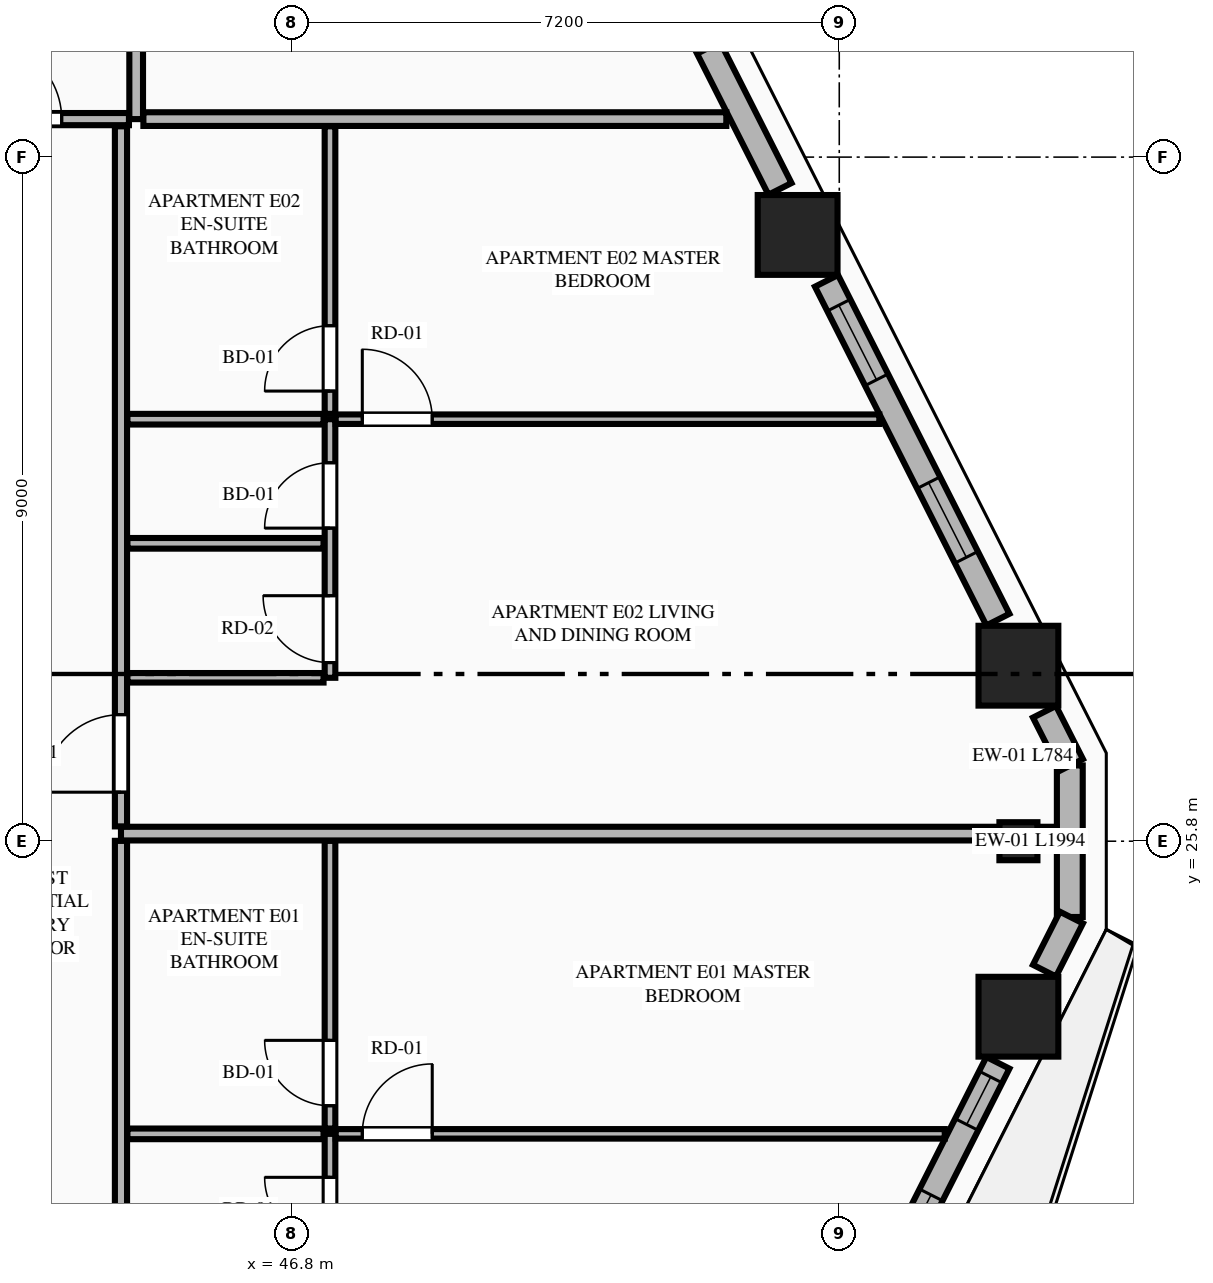
"""IFC4 building model, lengths in metres.
Left out: names, types, materials, properties, quantities, classifications, styles, units other than length and angle.
Written with IfcOpenShell. Run it as: python <this file> out.ifc"""

import sys

from ifc_helpers import new_model, si_unit, direction, frame, frame_2d, origin, origin_2d, place, context, subcontext, project, spatial, rectangle, extrude, element, fill, save


model = new_model("IFC4")
c1 = context("Model", 3, precision=1e-05, world=origin(), true_north=direction((0.0, 1.0)))
c2 = subcontext(c1, "Body", "Model", "MODEL_VIEW")
j1 = project(units=[si_unit("LENGTHUNIT", "METRE"), si_unit("PLANEANGLEUNIT", "RADIAN")], contexts=[c1])
p1 = place(None, origin())
s1 = spatial("IfcSite", under=j1, at=p1, CompositionType="ELEMENT")
p2 = place(p1, origin())
s2 = spatial("IfcBuilding", under=s1, at=p2, CompositionType="ELEMENT")
p3 = place(p2, frame((0.0, 0.0, 137.45)))
s3 = spatial("IfcBuildingStorey", under=s2, at=p3, CompositionType="ELEMENT", Elevation=137.45)
for number, where, z_axis, x_axis in (
    (1, (56.357, 23.491, 0.0), (0.0, 0.0, 1.0), (1.0, 0.0, 0.0)),
    (2, (56.357, 28.109, 0.0), (0.0, 0.0, 1.0), (1.0, 0.0, 0.0)),
    (3, (53.452, 33.776, 0.0), (0.0, 0.0, 1.0), (1.0, 0.0, 0.0)),
):
    element("IfcColumn", number, at=place(p3, frame(where, z_axis=z_axis, x_axis=x_axis)), inside=s3, PredefinedType="COLUMN", context=c2, shape_type="SweptSolid", body=[
        extrude(rectangle(XDim=1.05, YDim=1.05, at=origin_2d()), origin(), (0.0, 0.0, 1.0), 3.55),
    ])
p4 = place(p3, frame((56.357, 25.8, 0.0), z_axis=(0.0, 0.0, 1.0), x_axis=(0.0, 1.0, 0.0)))
e4 = element("IfcColumn", 4, at=p4, inside=s3, PredefinedType="PILASTER", context=c2, shape_type="SweptSolid", body=[
    extrude(rectangle(XDim=0.5, YDim=0.35, at=origin_2d()), origin(), (0.0, 0.0, 1.0), 3.55),
])
p5 = place(p3, frame((57.033, 24.803, 0.0), z_axis=(0.0, 0.0, 1.0), x_axis=(0.0, 1.0, 0.0)))
e5 = element("IfcWall", 5, at=p5, inside=s3, PredefinedType="STANDARD", context=c2, shape_type="SweptSolid", body=[
    extrude(rectangle(XDim=1.994, YDim=0.34, at=frame_2d((0.997, 0.0))), origin(), (0.0, 0.0, 1.0), 3.34),
])
p6 = place(p3, frame((53.832, 18.428, 0.0), z_axis=(0.0, 0.0, 1.0), x_axis=(0.451431617681, 0.892305718102, 0.0)))
e6 = element("IfcWall", 6, at=p6, inside=s3, PredefinedType="STANDARD", context=c2, shape_type="SweptSolid", body=[
    extrude(rectangle(XDim=4.995, YDim=0.34, at=frame_2d((2.498, 0.0))), origin(), (0.0, 0.0, 1.0), 2.797),
])
p7 = place(p6, frame((1.947, 0.0, 0.75)))
e7 = element("IfcOpeningElement", 7, at=p7, cuts=e6, PredefinedType="OPENING", context=c2, shape_type="SweptSolid", body=[
    extrude(rectangle(XDim=1.1, YDim=1.897, at=frame_2d((0.55, 0.948))), frame((0.0, 0.18, 0.0), z_axis=(0.0, -1.0, 0.0), x_axis=(1.0, 0.0, 0.0)), (0.0, 0.0, 1.0), 0.36),
])
p8 = place(p6, frame((4.085, 0.0, 0.75)))
e8 = element("IfcOpeningElement", 8, at=p8, cuts=e6, PredefinedType="OPENING", context=c2, shape_type="SweptSolid", body=[
    extrude(rectangle(XDim=0.7, YDim=1.897, at=frame_2d((0.35, 0.948))), frame((0.0, 0.18, 0.0), z_axis=(0.0, -1.0, 0.0), x_axis=(1.0, 0.0, 0.0)), (0.0, 0.0, 1.0), 0.36),
])
for number, where, z_axis, x_axis in (
    (9, (56.7, 24.097, 0.0), (0.0, 0.0, 1.0), (0.452, 0.892, 0.0)),
    (10, (57.054, 26.804, 0.0), (0.0, 0.0, 1.0), (-0.452, 0.892, 0.0)),
):
    element("IfcWall", number, at=place(p3, frame(where, z_axis=z_axis, x_axis=x_axis)), inside=s3, PredefinedType="STANDARD", context=c2, shape_type="SweptSolid", body=[
        extrude(rectangle(XDim=0.783, YDim=0.34, at=frame_2d((0.392, 0.0))), origin(), (0.0, 0.0, 1.0), 3.34),
    ])
p9 = place(p3, frame((56.087, 28.715, 0.0), z_axis=(0.0, 0.0, 1.0), x_axis=(-0.451431617681, 0.892305718102, 0.0)))
e11 = element("IfcWall", 11, at=p9, inside=s3, PredefinedType="STANDARD", context=c2, shape_type="SweptSolid", body=[
    extrude(rectangle(XDim=4.995, YDim=0.34, at=frame_2d((2.498, 0.0))), origin(), (0.0, 0.0, 1.0), 2.797),
])
p10 = place(p9, frame((0.919, 0.0, 0.75)))
e12 = element("IfcOpeningElement", 12, at=p10, cuts=e11, PredefinedType="OPENING", context=c2, shape_type="SweptSolid", body=[
    extrude(rectangle(XDim=1.1, YDim=1.897, at=frame_2d((0.55, 0.948))), frame((0.0, 0.18, 0.0), z_axis=(0.0, -1.0, 0.0), x_axis=(1.0, 0.0, 0.0)), (0.0, 0.0, 1.0), 0.36),
])
p11 = place(p9, frame((3.536, 0.0, 0.75)))
e13 = element("IfcOpeningElement", 13, at=p11, cuts=e11, PredefinedType="OPENING", context=c2, shape_type="SweptSolid", body=[
    extrude(rectangle(XDim=1.1, YDim=1.897, at=frame_2d((0.55, 0.948))), frame((0.0, 0.18, 0.0), z_axis=(0.0, -1.0, 0.0), x_axis=(1.0, 0.0, 0.0)), (0.0, 0.0, 1.0), 0.36),
])
p12 = place(p3, frame((53.22, 34.382, 0.0), z_axis=(0.0, 0.0, 1.0), x_axis=(-0.451567731634, 0.892236842855, 0.0)))
e14 = element("IfcWall", 14, at=p12, inside=s3, PredefinedType="STANDARD", context=c2, shape_type="SweptSolid", body=[
    extrude(rectangle(XDim=5.219, YDim=0.34, at=frame_2d((2.61, 0.0))), origin(), (0.0, 0.0, 1.0), 2.797),
])
p13 = place(p12, frame((2.06, 0.0, 0.75)))
e15 = element("IfcOpeningElement", 15, at=p13, cuts=e14, PredefinedType="OPENING", context=c2, shape_type="SweptSolid", body=[
    extrude(rectangle(XDim=1.1, YDim=1.897, at=frame_2d((0.55, 0.948))), frame((0.0, 0.18, 0.0), z_axis=(0.0, -1.0, 0.0), x_axis=(1.0, 0.0, 0.0)), (0.0, 0.0, 1.0), 0.36),
])
p14 = place(p3, frame((44.75, 35.3, 0.0), z_axis=(0.0, 0.0, 1.0), x_axis=(0.0, 1.0, 0.0)))
e16 = element("IfcWall", 16, at=p14, inside=s3, PredefinedType="PARTITIONING", context=c2, shape_type="SweptSolid", body=[
    extrude(rectangle(XDim=12.195, YDim=0.18, at=frame_2d((6.098, 0.0))), origin(), (0.0, 0.0, 1.0), 3.34),
])
p15 = place(p3, frame((28.663, 35.3, 0.0), z_axis=(0.0, 0.0, 1.0), x_axis=(1.0, 0.0, 0.0)))
e17 = element("IfcWall", 17, at=p15, inside=s3, PredefinedType="PARTITIONING", context=c2, shape_type="SweptSolid", body=[
    extrude(rectangle(XDim=15.992, YDim=0.16, at=frame_2d((7.996, 0.0))), origin(), (0.0, 0.0, 1.0), 3.34),
])
p16 = place(p15, frame((14.087, 0.0, 0.0)))
e18 = element("IfcOpeningElement", 18, at=p16, cuts=e17, PredefinedType="OPENING", context=c2, shape_type="SweptSolid", body=[
    extrude(rectangle(XDim=1.02, YDim=2.25, at=frame_2d((0.51, 1.125))), frame((0.0, 0.09, 0.0), z_axis=(0.0, -1.0, 0.0), x_axis=(1.0, 0.0, 0.0)), (0.0, 0.0, 1.0), 0.18),
])
p17 = place(p3, frame((44.845, 35.3, 0.0), z_axis=(0.0, 0.0, 1.0), x_axis=(1.0, 0.0, 0.0)))
e19 = element("IfcWall", 19, at=p17, inside=s3, PredefinedType="PARTITIONING", context=c2, shape_type="SweptSolid", body=[
    extrude(rectangle(XDim=7.669, YDim=0.18, at=frame_2d((3.834, 0.0))), origin(), (0.0, 0.0, 1.0), 3.34),
])
p18 = place(p3, frame((44.55, 16.595, 0.0), z_axis=(0.0, 0.0, 1.0), x_axis=(0.0, 1.0, 0.0)))
e20 = element("IfcWall", 20, at=p18, inside=s3, PredefinedType="PARTITIONING", context=c2, shape_type="SweptSolid", body=[
    extrude(rectangle(XDim=9.21, YDim=0.16, at=frame_2d((4.605, 0.0))), origin(), (0.0, 0.0, 1.0), 3.34),
])
p19 = place(p18, frame((0.45, 0.0, 0.0)))
e21 = element("IfcOpeningElement", 21, at=p19, cuts=e20, PredefinedType="OPENING", context=c2, shape_type="SweptSolid", body=[
    extrude(rectangle(XDim=1.02, YDim=2.25, at=frame_2d((0.51, 1.125))), frame((0.0, 0.09, 0.0), z_axis=(0.0, -1.0, 0.0), x_axis=(1.0, 0.0, 0.0)), (0.0, 0.0, 1.0), 0.18),
])
p20 = place(p3, frame((47.3, 18.55, 0.0), z_axis=(0.0, 0.0, 1.0), x_axis=(0.0, 1.0, 0.0)))
e22 = element("IfcWall", 22, at=p20, inside=s3, PredefinedType="PLUMBINGWALL", context=c2, shape_type="SweptSolid", body=[
    extrude(rectangle(XDim=3.4, YDim=0.14, at=frame_2d((1.7, 0.0))), origin(), (0.0, 0.0, 1.0), 3.34),
])
p21 = place(p20, frame((0.2, 0.0, 0.0)))
e23 = element("IfcOpeningElement", 23, at=p21, cuts=e22, PredefinedType="OPENING", context=c2, shape_type="SweptSolid", body=[
    extrude(rectangle(XDim=0.88, YDim=2.15, at=frame_2d((0.44, 1.075))), frame((0.0, 0.08, 0.0), z_axis=(0.0, -1.0, 0.0), x_axis=(1.0, 0.0, 0.0)), (0.0, 0.0, 1.0), 0.16),
])
p22 = place(p20, frame((1.968, 0.0, 0.0)))
e24 = element("IfcOpeningElement", 24, at=p22, cuts=e22, PredefinedType="OPENING", context=c2, shape_type="SweptSolid", body=[
    extrude(rectangle(XDim=0.86, YDim=2.1, at=frame_2d((0.43, 1.05))), frame((0.0, 0.08, 0.0), z_axis=(0.0, -1.0, 0.0), x_axis=(1.0, 0.0, 0.0)), (0.0, 0.0, 1.0), 0.16),
])
p23 = place(p3, frame((47.3, 22.02, 0.0), z_axis=(0.0, 0.0, 1.0), x_axis=(0.0, 1.0, 0.0)))
e25 = element("IfcWall", 25, at=p23, inside=s3, PredefinedType="PLUMBINGWALL", context=c2, shape_type="SweptSolid", body=[
    extrude(rectangle(XDim=3.785, YDim=0.14, at=frame_2d((1.893, 0.0))), origin(), (0.0, 0.0, 1.0), 3.34),
])
p24 = place(p23, frame((0.3, 0.0, 0.0)))
e26 = element("IfcOpeningElement", 26, at=p24, cuts=e25, PredefinedType="OPENING", context=c2, shape_type="SweptSolid", body=[
    extrude(rectangle(XDim=0.86, YDim=2.1, at=frame_2d((0.43, 1.05))), frame((0.0, 0.08, 0.0), z_axis=(0.0, -1.0, 0.0), x_axis=(1.0, 0.0, 0.0)), (0.0, 0.0, 1.0), 0.16),
])
p25 = place(p3, frame((44.635, 21.95, 0.0), z_axis=(0.0, 0.0, 1.0), x_axis=(1.0, 0.0, 0.0)))
e27 = element("IfcWall", 27, at=p25, inside=s3, PredefinedType="PLUMBINGWALL", context=c2, shape_type="SweptSolid", body=[
    extrude(rectangle(XDim=2.58, YDim=0.14, at=frame_2d((1.29, 0.0))), origin(), (0.0, 0.0, 1.0), 3.34),
])
p26 = place(p3, frame((47.375, 21.95, 0.0), z_axis=(0.0, 0.0, 1.0), x_axis=(1.0, 0.0, 0.0)))
e28 = element("IfcWall", 28, at=p26, inside=s3, PredefinedType="PARTITIONING", context=c2, shape_type="SweptSolid", body=[
    extrude(rectangle(XDim=8.013, YDim=0.125, at=frame_2d((4.006, 0.0))), origin(), (0.0, 0.0, 1.0), 3.34),
])
p27 = place(p26, frame((0.35, 0.0, 0.0)))
e29 = element("IfcOpeningElement", 29, at=p27, cuts=e28, PredefinedType="OPENING", context=c2, shape_type="SweptSolid", body=[
    extrude(rectangle(XDim=0.92, YDim=2.15, at=frame_2d((0.46, 1.075))), frame((0.0, 0.073, 0.0), z_axis=(0.0, -1.0, 0.0), x_axis=(1.0, 0.0, 0.0)), (0.0, 0.0, 1.0), 0.145),
])
p28 = place(p3, frame((44.55, 25.9, 0.0), z_axis=(0.0, 0.0, 1.0), x_axis=(1.0, 0.0, 0.0)))
e30 = element("IfcWall", 30, at=p28, inside=s3, PredefinedType="PARTITIONING", context=c2, shape_type="SweptSolid", body=[
    extrude(rectangle(XDim=12.308, YDim=0.18, at=frame_2d((6.154, 0.0))), origin(), (0.0, 0.0, 1.0), 3.34),
])
p29 = place(p3, frame((44.55, 25.995, 0.0), z_axis=(0.0, 0.0, 1.0), x_axis=(0.0, 1.0, 0.0)))
e31 = element("IfcWall", 31, at=p29, inside=s3, PredefinedType="PARTITIONING", context=c2, shape_type="SweptSolid", body=[
    extrude(rectangle(XDim=9.21, YDim=0.16, at=frame_2d((4.605, 0.0))), origin(), (0.0, 0.0, 1.0), 3.34),
])
p30 = place(p29, frame((0.45, 0.0, 0.0)))
e32 = element("IfcOpeningElement", 32, at=p30, cuts=e31, PredefinedType="OPENING", context=c2, shape_type="SweptSolid", body=[
    extrude(rectangle(XDim=1.02, YDim=2.25, at=frame_2d((0.51, 1.125))), frame((0.0, 0.09, 0.0), z_axis=(0.0, -1.0, 0.0), x_axis=(1.0, 0.0, 0.0)), (0.0, 0.0, 1.0), 0.18),
])
p31 = place(p3, frame((44.635, 27.95, 0.0), z_axis=(0.0, 0.0, 1.0), x_axis=(1.0, 0.0, 0.0)))
e33 = element("IfcWall", 33, at=p31, inside=s3, PredefinedType="PARTITIONING", context=c2, shape_type="SweptSolid", body=[
    extrude(rectangle(XDim=2.58, YDim=0.125, at=frame_2d((1.29, 0.0))), origin(), (0.0, 0.0, 1.0), 3.34),
])
p32 = place(p3, frame((47.3, 27.95, 0.0), z_axis=(0.0, 0.0, 1.0), x_axis=(0.0, 1.0, 0.0)))
e34 = element("IfcWall", 34, at=p32, inside=s3, PredefinedType="PLUMBINGWALL", context=c2, shape_type="SweptSolid", body=[
    extrude(rectangle(XDim=3.402, YDim=0.14, at=frame_2d((1.701, 0.0))), origin(), (0.0, 0.0, 1.0), 3.34),
])
p33 = place(p32, frame((0.2, 0.0, 0.0)))
e35 = element("IfcOpeningElement", 35, at=p33, cuts=e34, PredefinedType="OPENING", context=c2, shape_type="SweptSolid", body=[
    extrude(rectangle(XDim=0.88, YDim=2.15, at=frame_2d((0.44, 1.075))), frame((0.0, 0.08, 0.0), z_axis=(0.0, -1.0, 0.0), x_axis=(1.0, 0.0, 0.0)), (0.0, 0.0, 1.0), 0.16),
])
p34 = place(p32, frame((1.969, 0.0, 0.0)))
e36 = element("IfcOpeningElement", 36, at=p34, cuts=e34, PredefinedType="OPENING", context=c2, shape_type="SweptSolid", body=[
    extrude(rectangle(XDim=0.86, YDim=2.1, at=frame_2d((0.43, 1.05))), frame((0.0, 0.08, 0.0), z_axis=(0.0, -1.0, 0.0), x_axis=(1.0, 0.0, 0.0)), (0.0, 0.0, 1.0), 0.16),
])
p35 = place(p3, frame((47.3, 31.422, 0.0), z_axis=(0.0, 0.0, 1.0), x_axis=(0.0, 1.0, 0.0)))
e37 = element("IfcWall", 37, at=p35, inside=s3, PredefinedType="PLUMBINGWALL", context=c2, shape_type="SweptSolid", body=[
    extrude(rectangle(XDim=3.783, YDim=0.14, at=frame_2d((1.892, 0.0))), origin(), (0.0, 0.0, 1.0), 3.34),
])
p36 = place(p35, frame((0.3, 0.0, 0.0)))
e38 = element("IfcOpeningElement", 38, at=p36, cuts=e37, PredefinedType="OPENING", context=c2, shape_type="SweptSolid", body=[
    extrude(rectangle(XDim=0.86, YDim=2.1, at=frame_2d((0.43, 1.05))), frame((0.0, 0.08, 0.0), z_axis=(0.0, -1.0, 0.0), x_axis=(1.0, 0.0, 0.0)), (0.0, 0.0, 1.0), 0.16),
])
p37 = place(p3, frame((44.635, 31.352, 0.0), z_axis=(0.0, 0.0, 1.0), x_axis=(1.0, 0.0, 0.0)))
e39 = element("IfcWall", 39, at=p37, inside=s3, PredefinedType="PLUMBINGWALL", context=c2, shape_type="SweptSolid", body=[
    extrude(rectangle(XDim=2.58, YDim=0.14, at=frame_2d((1.29, 0.0))), origin(), (0.0, 0.0, 1.0), 3.34),
])
p38 = place(p3, frame((47.375, 31.352, 0.0), z_axis=(0.0, 0.0, 1.0), x_axis=(1.0, 0.0, 0.0)))
e40 = element("IfcWall", 40, at=p38, inside=s3, PredefinedType="PARTITIONING", context=c2, shape_type="SweptSolid", body=[
    extrude(rectangle(XDim=7.152, YDim=0.125, at=frame_2d((3.576, 0.0))), origin(), (0.0, 0.0, 1.0), 3.34),
])
p39 = place(p38, frame((0.35, 0.0, 0.0)))
e41 = element("IfcOpeningElement", 41, at=p39, cuts=e40, PredefinedType="OPENING", context=c2, shape_type="SweptSolid", body=[
    extrude(rectangle(XDim=0.92, YDim=2.15, at=frame_2d((0.46, 1.075))), frame((0.0, 0.073, 0.0), z_axis=(0.0, -1.0, 0.0), x_axis=(1.0, 0.0, 0.0)), (0.0, 0.0, 1.0), 0.145),
])
p40 = place(p3, frame((44.635, 29.719, 0.0), z_axis=(0.0, 0.0, 1.0), x_axis=(1.0, 0.0, 0.0)))
e42 = element("IfcWall", 42, at=p40, inside=s3, PredefinedType="PLUMBINGWALL", context=c2, shape_type="SweptSolid", body=[
    extrude(rectangle(XDim=2.58, YDim=0.14, at=frame_2d((1.29, 0.0))), origin(), (0.0, 0.0, 1.0), 3.34),
])
p41 = place(p7, origin())
e43 = element("IfcWindow", 43, at=p41, inside=s3, PartitioningType="SINGLE_PANEL", PredefinedType="WINDOW", context=c2, shape_type="SweptSolid", body=[
    extrude(rectangle(XDim=1.1, YDim=1.897, at=frame_2d((0.55, 0.948))), frame((0.0, 0.03, 0.0), z_axis=(0.0, -1.0, 0.0), x_axis=(1.0, 0.0, 0.0)), (0.0, 0.0, 1.0), 0.06),
])
fill(e7, e43)
p42 = place(p10, origin())
e44 = element("IfcWindow", 44, at=p42, inside=s3, PartitioningType="SINGLE_PANEL", PredefinedType="WINDOW", context=c2, shape_type="SweptSolid", body=[
    extrude(rectangle(XDim=1.1, YDim=1.897, at=frame_2d((0.55, 0.948))), frame((0.0, 0.03, 0.0), z_axis=(0.0, -1.0, 0.0), x_axis=(1.0, 0.0, 0.0)), (0.0, 0.0, 1.0), 0.06),
])
fill(e12, e44)
p43 = place(p16, origin())
e45 = element("IfcDoor", 45, at=p43, inside=s3, OperationType="SINGLE_SWING_LEFT", PredefinedType="DOOR", context=c2, shape_type="SweptSolid", body=[
    extrude(rectangle(XDim=1.02, YDim=2.25, at=frame_2d((0.51, 1.125))), frame((0.0, 0.025, 0.0), z_axis=(0.0, -1.0, 0.0), x_axis=(1.0, 0.0, 0.0)), (0.0, 0.0, 1.0), 0.05),
])
fill(e18, e45)
p44 = place(p22, origin())
e46 = element("IfcDoor", 46, at=p44, inside=s3, OperationType="SINGLE_SWING_RIGHT", PredefinedType="DOOR", context=c2, shape_type="SweptSolid", body=[
    extrude(rectangle(XDim=0.86, YDim=2.1, at=frame_2d((0.43, 1.05))), frame((0.0, 0.025, 0.0), z_axis=(0.0, -1.0, 0.0), x_axis=(1.0, 0.0, 0.0)), (0.0, 0.0, 1.0), 0.05),
])
fill(e24, e46)
p45 = place(p24, origin())
e47 = element("IfcDoor", 47, at=p45, inside=s3, OperationType="SINGLE_SWING_RIGHT", PredefinedType="DOOR", context=c2, shape_type="SweptSolid", body=[
    extrude(rectangle(XDim=0.86, YDim=2.1, at=frame_2d((0.43, 1.05))), frame((0.0, 0.025, 0.0), z_axis=(0.0, -1.0, 0.0), x_axis=(1.0, 0.0, 0.0)), (0.0, 0.0, 1.0), 0.05),
])
fill(e26, e47)
p46 = place(p27, origin())
e48 = element("IfcDoor", 48, at=p46, inside=s3, OperationType="SINGLE_SWING_RIGHT", PredefinedType="DOOR", context=c2, shape_type="SweptSolid", body=[
    extrude(rectangle(XDim=0.92, YDim=2.15, at=frame_2d((0.46, 1.075))), frame((0.0, 0.025, 0.0), z_axis=(0.0, -1.0, 0.0), x_axis=(1.0, 0.0, 0.0)), (0.0, 0.0, 1.0), 0.05),
])
fill(e29, e48)
p47 = place(p33, origin())
e49 = element("IfcDoor", 49, at=p47, inside=s3, OperationType="SINGLE_SWING_RIGHT", PredefinedType="DOOR", context=c2, shape_type="SweptSolid", body=[
    extrude(rectangle(XDim=0.88, YDim=2.15, at=frame_2d((0.44, 1.075))), frame((0.0, 0.025, 0.0), z_axis=(0.0, -1.0, 0.0), x_axis=(1.0, 0.0, 0.0)), (0.0, 0.0, 1.0), 0.05),
])
fill(e35, e49)
p48 = place(p34, origin())
e50 = element("IfcDoor", 50, at=p48, inside=s3, OperationType="SINGLE_SWING_LEFT", PredefinedType="DOOR", context=c2, shape_type="SweptSolid", body=[
    extrude(rectangle(XDim=0.86, YDim=2.1, at=frame_2d((0.43, 1.05))), frame((0.0, 0.025, 0.0), z_axis=(0.0, -1.0, 0.0), x_axis=(1.0, 0.0, 0.0)), (0.0, 0.0, 1.0), 0.05),
])
fill(e36, e50)
p49 = place(p36, origin())
e51 = element("IfcDoor", 51, at=p49, inside=s3, OperationType="SINGLE_SWING_LEFT", PredefinedType="DOOR", context=c2, shape_type="SweptSolid", body=[
    extrude(rectangle(XDim=0.86, YDim=2.1, at=frame_2d((0.43, 1.05))), frame((0.0, 0.025, 0.0), z_axis=(0.0, -1.0, 0.0), x_axis=(1.0, 0.0, 0.0)), (0.0, 0.0, 1.0), 0.05),
])
fill(e38, e51)
p50 = place(p30, origin())
e52 = element("IfcDoor", 52, at=p50, inside=s3, OperationType="SINGLE_SWING_LEFT", PredefinedType="DOOR", context=c2, shape_type="SweptSolid", body=[
    extrude(rectangle(XDim=1.02, YDim=2.25, at=frame_2d((0.51, 1.125))), frame((0.0, 0.025, 0.0), z_axis=(0.0, -1.0, 0.0), x_axis=(1.0, 0.0, 0.0)), (0.0, 0.0, 1.0), 0.05),
])
fill(e32, e52)
p51 = place(p39, origin())
e53 = element("IfcDoor", 53, at=p51, inside=s3, OperationType="SINGLE_SWING_LEFT", PredefinedType="DOOR", context=c2, shape_type="SweptSolid", body=[
    extrude(rectangle(XDim=0.92, YDim=2.15, at=frame_2d((0.46, 1.075))), frame((0.0, 0.025, 0.0), z_axis=(0.0, -1.0, 0.0), x_axis=(1.0, 0.0, 0.0)), (0.0, 0.0, 1.0), 0.05),
])
fill(e41, e53)
p52 = place(p11, origin())
e54 = element("IfcWindow", 54, at=p52, inside=s3, PartitioningType="SINGLE_PANEL", PredefinedType="WINDOW", context=c2, shape_type="SweptSolid", body=[
    extrude(rectangle(XDim=1.1, YDim=1.897, at=frame_2d((0.55, 0.948))), frame((0.0, 0.03, 0.0), z_axis=(0.0, -1.0, 0.0), x_axis=(1.0, 0.0, 0.0)), (0.0, 0.0, 1.0), 0.06),
])
fill(e13, e54)
p53 = place(p8, origin())
e55 = element("IfcWindow", 55, at=p53, inside=s3, PartitioningType="SINGLE_PANEL", PredefinedType="WINDOW", context=c2, shape_type="SweptSolid", body=[
    extrude(rectangle(XDim=0.7, YDim=1.897, at=frame_2d((0.35, 0.948))), frame((0.0, 0.03, 0.0), z_axis=(0.0, -1.0, 0.0), x_axis=(1.0, 0.0, 0.0)), (0.0, 0.0, 1.0), 0.06),
])
fill(e8, e55)
save(model, sys.argv[1])
